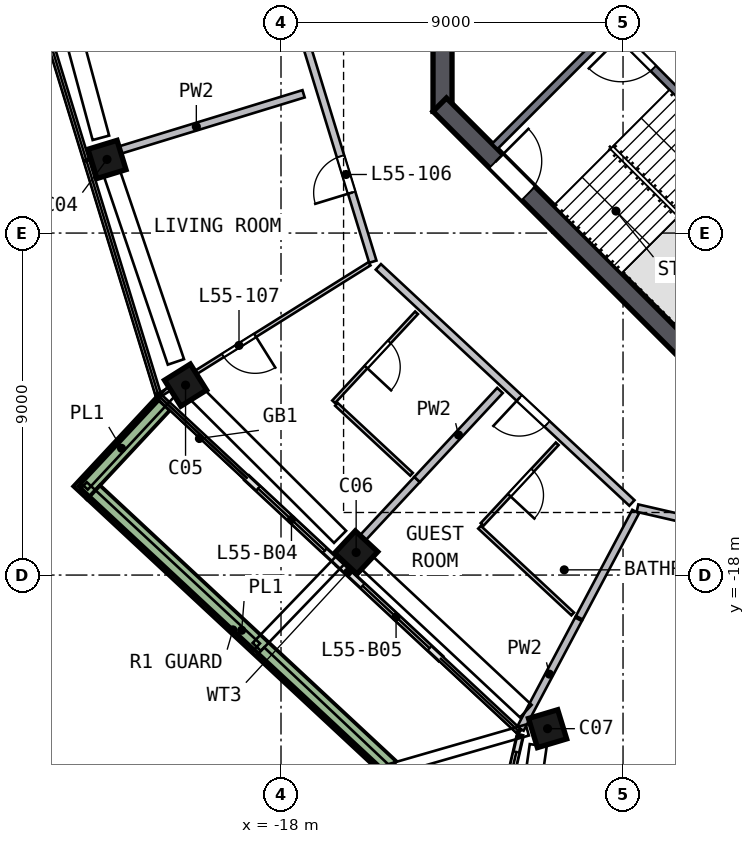
"""IFC4 building model, lengths in metres.
Left out: names, types, materials, properties, quantities, classifications, styles, units other than length and angle.
Written with IfcOpenShell. Run it as: python <this file> out.ifc"""

import sys

from ifc_helpers import new_model, si_unit, direction, frame, frame_2d, origin, origin_2d, place, context, subcontext, project, spatial, rectangle, extrude, element, fill, save


model = new_model("IFC4")
c1 = context("Model", 3, precision=1e-05, world=origin(), true_north=direction((0.0, 1.0)))
c2 = subcontext(c1, "Body", "Model", "MODEL_VIEW")
j1 = project(units=[si_unit("LENGTHUNIT", "METRE"), si_unit("PLANEANGLEUNIT", "RADIAN")], contexts=[c1])
p1 = place(None, origin())
s1 = spatial("IfcSite", under=j1, at=p1, CompositionType="ELEMENT")
p2 = place(p1, origin())
s2 = spatial("IfcBuilding", under=s1, at=p2, CompositionType="ELEMENT")
p3 = place(p2, frame((0.0, 0.0, 227.0)))
s3 = spatial("IfcBuildingStorey", under=s2, at=p3, CompositionType="ELEMENT", Elevation=227.0)
p4 = place(p3, frame((-22.62, -6.933, 0.0), z_axis=(0.033841596, -0.107304475, 0.993650087), x_axis=(0.290813838, -0.950141415, -0.112510462)))
e1 = element("IfcColumn", 1, at=p4, inside=s3, PredefinedType="COLUMN", context=c2, shape_type="SweptSolid", body=[
    extrude(rectangle(XDim=0.8, YDim=0.8, at=origin_2d()), origin(), (0.0, 0.0, 1.0), 3.21),
])
p5 = place(p3, frame((-20.587, -12.884, 0.0), z_axis=(0.062110189, -0.097384519, 0.993306891), x_axis=(-0.52699861, 0.841980994, 0.115500958)))
e2 = element("IfcColumn", 2, at=p5, inside=s3, PredefinedType="COLUMN", context=c2, shape_type="SweptSolid", body=[
    extrude(rectangle(XDim=0.8, YDim=0.8, at=origin_2d()), origin(), (0.0, 0.0, 1.0), 3.211),
])
p6 = place(p3, frame((-16.123, -17.314, 0.0), z_axis=(0.082969105, -0.075972627, 0.993651995), x_axis=(0.727116922, -0.677234205, -0.112493612)))
e3 = element("IfcColumn", 3, at=p6, inside=s3, PredefinedType="COLUMN", context=c2, shape_type="SweptSolid", body=[
    extrude(rectangle(XDim=0.8, YDim=0.8, at=origin_2d()), origin(), (0.0, 0.0, 1.0), 3.21),
])
p7 = place(p3, frame((-11.113, -21.979, 0.0), z_axis=(0.104966556, -0.051989228, 0.993115876), x_axis=(-0.285378183, 0.95505692, 0.080159667)))
e4 = element("IfcColumn", 4, at=p7, inside=s3, PredefinedType="COLUMN", context=c2, shape_type="SweptSolid", body=[
    extrude(rectangle(XDim=0.8, YDim=0.8, at=origin_2d()), origin(), (0.0, 0.0, 1.0), 3.212),
])
p8 = place(p3, frame((-7.25, -23.224, 0.0), z_axis=(0.110686507, -0.03352524, 0.993289764), x_axis=(-0.225055489, -0.974314679, -0.007805907)))
e5 = element("IfcColumn", 5, at=p8, inside=s3, PredefinedType="COLUMN", context=c2, shape_type="SweptSolid", body=[
    extrude(rectangle(XDim=0.8, YDim=0.8, at=origin_2d()), origin(), (0.0, 0.0, 1.0), 3.211),
])
p9 = place(p3, frame((-13.75, 5.799, 0.0), z_axis=(0.0, 0.0, 1.0), x_axis=(0.0, -1.0, 0.0)))
e6 = element("IfcWall", 6, at=p9, inside=s3, PredefinedType="SHEAR", context=c2, shape_type="SweptSolid", body=[
    extrude(rectangle(XDim=11.598, YDim=0.5, at=frame_2d((5.799, 0.0))), origin(), (0.0, 0.0, 1.0), 3.5),
])
p10 = place(p9, frame((4.899, 0.0, 0.0)))
e7 = element("IfcOpeningElement", 7, at=p10, cuts=e6, PredefinedType="OPENING", context=c2, shape_type="SweptSolid", body=[
    extrude(rectangle(XDim=1.8, YDim=2.1, at=frame_2d((0.9, 1.05))), frame((0.0, 0.26, 0.0), z_axis=(0.0, -1.0, 0.0), x_axis=(1.0, 0.0, 0.0)), (0.0, 0.0, 1.0), 0.52),
])
p11 = place(p3, frame((-13.823, -5.622, 0.0), z_axis=(0.0, 0.0, 1.0), x_axis=(0.707106781, -0.707106781, 0.0)))
e8 = element("IfcWall", 8, at=p11, inside=s3, PredefinedType="SHEAR", context=c2, shape_type="SweptSolid", body=[
    extrude(rectangle(XDim=11.598, YDim=0.5, at=frame_2d((5.799, 0.0))), origin(), (0.0, 0.0, 1.0), 3.5),
])
p12 = place(p11, frame((2.099, 0.0, 0.0)))
e9 = element("IfcOpeningElement", 9, at=p12, cuts=e8, PredefinedType="OPENING", context=c2, shape_type="SweptSolid", body=[
    extrude(rectangle(XDim=1.2, YDim=2.1, at=frame_2d((0.6, 1.05))), frame((0.0, 0.26, 0.0), z_axis=(0.0, -1.0, 0.0), x_axis=(1.0, 0.0, 0.0)), (0.0, 0.0, 1.0), 0.52),
])
p13 = place(p3, frame((-18.896, -15.449, 0.0), z_axis=(0.0, 0.0, 1.0), x_axis=(0.731849441, -0.681466357, 0.0)))
e10 = element("IfcWall", 10, at=p13, inside=s3, PredefinedType="SOLIDWALL", context=c2, shape_type="SweptSolid", body=[
    extrude(rectangle(XDim=3.3, YDim=0.15, at=frame_2d((1.65, 0.0))), origin(), (0.0, 0.0, 1.0), 2.525),
])
p14 = place(p13, frame((0.4, 0.0, 0.0)))
e11 = element("IfcOpeningElement", 11, at=p14, cuts=e10, PredefinedType="OPENING", context=c2, shape_type="SweptSolid", body=[
    extrude(rectangle(XDim=2.4, YDim=2.4, at=frame_2d((1.2, 1.2))), frame((0.0, 0.085, 0.0), z_axis=(0.0, -1.0, 0.0), x_axis=(1.0, 0.0, 0.0)), (0.0, 0.0, 1.0), 0.17),
])
p15 = place(p3, frame((-16.481, -17.698, 0.0), z_axis=(0.0, 0.0, 1.0), x_axis=(0.7318309, -0.681486268, 0.0)))
e12 = element("IfcWall", 12, at=p15, inside=s3, PredefinedType="SOLIDWALL", context=c2, shape_type="SweptSolid", body=[
    extrude(rectangle(XDim=3.661, YDim=0.15, at=frame_2d((1.831, 0.0))), origin(), (0.0, 0.0, 1.0), 2.525),
])
p16 = place(p15, frame((0.861, 0.0, 0.0)))
e13 = element("IfcOpeningElement", 13, at=p16, cuts=e12, PredefinedType="OPENING", context=c2, shape_type="SweptSolid", body=[
    extrude(rectangle(XDim=2.4, YDim=2.4, at=frame_2d((1.2, 1.2))), frame((0.0, 0.085, 0.0), z_axis=(0.0, -1.0, 0.0), x_axis=(1.0, 0.0, 0.0)), (0.0, 0.0, 1.0), 0.17),
])
p17 = place(p3, frame((-11.718, -22.268, 0.0), z_axis=(0.0, 0.0, 1.0), x_axis=(-0.224218701, -0.974538852, 0.0)))
e14 = element("IfcWall", 14, at=p17, inside=s3, PredefinedType="SOLIDWALL", context=c2, shape_type="SweptSolid", body=[
    extrude(rectangle(XDim=3.2, YDim=0.15, at=frame_2d((1.6, 0.0))), origin(), (0.0, 0.0, 1.0), 2.525),
])
p18 = place(p17, frame((0.4, 0.0, 0.0)))
e15 = element("IfcOpeningElement", 15, at=p18, cuts=e14, PredefinedType="OPENING", context=c2, shape_type="SweptSolid", body=[
    extrude(rectangle(XDim=2.4, YDim=2.4, at=frame_2d((1.2, 1.2))), frame((0.0, 0.085, 0.0), z_axis=(0.0, -1.0, 0.0), x_axis=(1.0, 0.0, 0.0)), (0.0, 0.0, 1.0), 0.17),
])
p19 = place(p3, frame((-21.106, -13.494, 0.0), z_axis=(0.0, 0.0, 1.0), x_axis=(-0.681472097, -0.731844096, 0.0)))
e16 = element("IfcWall", 16, at=p19, inside=s3, PredefinedType="SOLIDWALL", context=c2, shape_type="SweptSolid", body=[
    extrude(rectangle(XDim=3.199, YDim=0.5, at=frame_2d((1.6, 0.0))), origin(), (0.0, 0.0, 1.0), 0.7),
])
p20 = place(p3, frame((-22.933, -15.823, 0.0), z_axis=(0.0, 0.0, 1.0), x_axis=(0.731834456, -0.681482449, 0.0)))
e17 = element("IfcWall", 17, at=p20, inside=s3, PredefinedType="SOLIDWALL", context=c2, shape_type="SweptSolid", body=[
    extrude(rectangle(XDim=10.653, YDim=0.5, at=frame_2d((5.326, 0.0))), origin(), (0.0, 0.0, 1.0), 0.7),
])
p21 = place(p3, frame((-3.535, -9.334, 0.0), z_axis=(0.0, 0.0, 1.0), x_axis=(-0.707120946, 0.707092617, 0.0)))
e18 = element("IfcWall", 18, at=p21, inside=s3, PredefinedType="SOLIDWALL", context=c2, shape_type="SweptSolid", body=[
    extrude(rectangle(XDim=8.618, YDim=0.2, at=frame_2d((4.309, 0.0))), origin(), (0.0, 0.0, 1.0), 3.19),
])
p22 = place(p21, frame((6.6, 0.0, 0.0)))
e19 = element("IfcOpeningElement", 19, at=p22, cuts=e18, PredefinedType="OPENING", context=c2, shape_type="SweptSolid", body=[
    extrude(rectangle(XDim=1.2, YDim=2.1, at=frame_2d((0.6, 1.05))), frame((0.0, 0.11, 0.0), z_axis=(0.0, -1.0, 0.0), x_axis=(1.0, 0.0, 0.0)), (0.0, 0.0, 1.0), 0.22),
])
p23 = place(p3, frame((-9.334, -3.677, 0.0), z_axis=(0.0, 0.0, 1.0), x_axis=(-0.707135168, -0.707078393, 0.0)))
e20 = element("IfcWall", 20, at=p23, inside=s3, PredefinedType="SOLIDWALL", context=c2, shape_type="SweptSolid", body=[
    extrude(rectangle(XDim=4.3, YDim=0.2, at=frame_2d((2.15, 0.0))), origin(), (0.0, 0.0, 1.0), 3.19),
])
p24 = place(p3, frame((-15.584, -9.753, 0.0), z_axis=(0.0, 0.0, 1.0), x_axis=(-0.293036013, 0.956101404, 0.0)))
e21 = element("IfcWall", 21, at=p24, inside=s3, PredefinedType="SOLIDWALL", context=c2, shape_type="SweptSolid", body=[
    extrude(rectangle(XDim=9.316, YDim=0.2, at=frame_2d((4.658, 0.0))), origin(), (0.0, 0.0, 1.0), 3.19),
])
p25 = place(p24, frame((1.9, 0.0, 0.0)))
e22 = element("IfcOpeningElement", 22, at=p25, cuts=e21, PredefinedType="OPENING", context=c2, shape_type="SweptSolid", body=[
    extrude(rectangle(XDim=1.0, YDim=2.1, at=frame_2d((0.5, 1.05))), frame((0.0, 0.11, 0.0), z_axis=(0.0, -1.0, 0.0), x_axis=(1.0, 0.0, 0.0)), (0.0, 0.0, 1.0), 0.22),
])
p26 = place(p3, frame((-8.766, -16.103, 0.0), z_axis=(0.0, 0.0, 1.0), x_axis=(-0.731831338, 0.681485798, 0.0)))
e23 = element("IfcWall", 23, at=p26, inside=s3, PredefinedType="SOLIDWALL", context=c2, shape_type="SweptSolid", body=[
    extrude(rectangle(XDim=9.117, YDim=0.2, at=frame_2d((4.558, 0.0))), origin(), (0.0, 0.0, 1.0), 3.19),
])
p27 = place(p26, frame((3.05, 0.0, 0.0)))
e24 = element("IfcOpeningElement", 24, at=p27, cuts=e23, PredefinedType="OPENING", context=c2, shape_type="SweptSolid", body=[
    extrude(rectangle(XDim=1.0, YDim=2.1, at=frame_2d((0.5, 1.05))), frame((0.0, 0.11, 0.0), z_axis=(0.0, -1.0, 0.0), x_axis=(1.0, 0.0, 0.0)), (0.0, 0.0, 1.0), 0.22),
])
p28 = place(p3, frame((0.654, -18.373, 0.0), z_axis=(0.0, 0.0, 1.0), x_axis=(-0.974527215, 0.224269274, 0.0)))
e25 = element("IfcWall", 25, at=p28, inside=s3, PredefinedType="SOLIDWALL", context=c2, shape_type="SweptSolid", body=[
    extrude(rectangle(XDim=9.517, YDim=0.2, at=frame_2d((4.758, 0.0))), origin(), (0.0, 0.0, 1.0), 3.19),
])
p29 = place(p28, frame((3.842, 0.0, 0.0)))
e26 = element("IfcOpeningElement", 26, at=p29, cuts=e25, PredefinedType="OPENING", context=c2, shape_type="SweptSolid", body=[
    extrude(rectangle(XDim=1.8, YDim=2.1, at=frame_2d((0.9, 1.05))), frame((0.0, 0.11, 0.0), z_axis=(0.0, -1.0, 0.0), x_axis=(1.0, 0.0, 0.0)), (0.0, 0.0, 1.0), 0.22),
])
p30 = place(p3, frame((-17.406, -5.335, 0.0), z_axis=(0.0, 0.0, 1.0), x_axis=(-0.956095937, -0.293053849, 0.0)))
e27 = element("IfcWall", 27, at=p30, inside=s3, PredefinedType="SOLIDWALL", context=c2, shape_type="SweptSolid", body=[
    extrude(rectangle(XDim=5.902, YDim=0.2, at=frame_2d((2.951, 0.0))), origin(), (0.0, 0.0, 1.0), 3.19),
])
p31 = place(p3, frame((-14.419, -15.484, 0.0), z_axis=(0.0, 0.0, 1.0), x_axis=(-0.681456745, -0.731858391, 0.0)))
e28 = element("IfcWall", 28, at=p31, inside=s3, PredefinedType="SOLIDWALL", context=c2, shape_type="SweptSolid", body=[
    extrude(rectangle(XDim=2.95, YDim=0.2, at=frame_2d((1.475, 0.0))), origin(), (0.0, 0.0, 1.0), 3.19),
])
p32 = place(p3, frame((-12.238, -13.142, 0.0), z_axis=(0.0, 0.0, 1.0), x_axis=(-0.681483346, -0.731833621, 0.0)))
e29 = element("IfcWall", 29, at=p32, inside=s3, PredefinedType="SOLIDWALL", context=c2, shape_type="SweptSolid", body=[
    extrude(rectangle(XDim=3.2, YDim=0.2, at=frame_2d((1.6, 0.0))), origin(), (0.0, 0.0, 1.0), 3.19),
])
p33 = place(p3, frame((-11.705, -22.05, 0.0), z_axis=(0.0, 0.0, 1.0), x_axis=(0.468862108, 0.883271376, 0.0)))
e30 = element("IfcWall", 30, at=p33, inside=s3, PredefinedType="SOLIDWALL", context=c2, shape_type="SweptSolid", body=[
    extrude(rectangle(XDim=3.269, YDim=0.2, at=frame_2d((1.634, 0.0))), origin(), (0.0, 0.0, 1.0), 3.19),
])
p34 = place(p3, frame((-10.151, -19.123, 0.0), z_axis=(0.0, 0.0, 1.0), x_axis=(0.468919942, 0.883240674, 0.0)))
e31 = element("IfcWall", 31, at=p34, inside=s3, PredefinedType="SOLIDWALL", context=c2, shape_type="SweptSolid", body=[
    extrude(rectangle(XDim=3.161, YDim=0.2, at=frame_2d((1.581, 0.0))), origin(), (0.0, 0.0, 1.0), 3.19),
])
p35 = place(p3, frame((-8.042, -27.148, 0.0), z_axis=(0.0, 0.0, 1.0), x_axis=(0.224281387, 0.974524427, 0.0)))
e32 = element("IfcWall", 32, at=p35, inside=s3, PredefinedType="SOLIDWALL", context=c2, shape_type="SweptSolid", body=[
    extrude(rectangle(XDim=10.302, YDim=0.2, at=frame_2d((5.151, 0.0))), origin(), (0.0, 0.0, 1.0), 3.19),
])
p36 = place(p35, frame((2.5, 0.0, 0.0)))
e33 = element("IfcOpeningElement", 33, at=p36, cuts=e32, PredefinedType="OPENING", context=c2, shape_type="SweptSolid", body=[
    extrude(rectangle(XDim=1.0, YDim=2.1, at=frame_2d((0.5, 1.05))), frame((0.0, 0.11, 0.0), z_axis=(0.0, -1.0, 0.0), x_axis=(1.0, 0.0, 0.0)), (0.0, 0.0, 1.0), 0.22),
])
p37 = place(p3, frame((-15.672, -9.808, 0.0), z_axis=(0.0, 0.0, 1.0), x_axis=(-0.847695291, -0.530483453, 0.0)))
e34 = element("IfcWall", 34, at=p37, inside=s3, PredefinedType="PARTITIONING", context=c2, shape_type="SweptSolid", body=[
    extrude(rectangle(XDim=6.476, YDim=0.1, at=frame_2d((3.238, 0.0))), origin(), (0.0, 0.0, 1.0), 3.19),
])
p38 = place(p37, frame((3.55, 0.0, 0.0)))
e35 = element("IfcOpeningElement", 35, at=p38, cuts=e34, PredefinedType="OPENING", context=c2, shape_type="SweptSolid", body=[
    extrude(rectangle(XDim=1.0, YDim=2.1, at=frame_2d((0.5, 1.05))), frame((0.0, 0.06, 0.0), z_axis=(0.0, -1.0, 0.0), x_axis=(1.0, 0.0, 0.0)), (0.0, 0.0, 1.0), 0.12),
])
p39 = place(p3, frame((-16.542, -13.508, 0.0), z_axis=(0.0, 0.0, 1.0), x_axis=(0.731884644, -0.681428549, 0.0)))
e36 = element("IfcWall", 36, at=p39, inside=s3, PredefinedType="PARTITIONING", context=c2, shape_type="SweptSolid", body=[
    extrude(rectangle(XDim=2.7, YDim=0.1, at=frame_2d((1.35, 0.0))), origin(), (0.0, 0.0, 1.0), 3.19),
])
p40 = place(p3, frame((-14.434, -11.098, 0.0), z_axis=(0.0, 0.0, 1.0), x_axis=(-0.681480535, -0.731836239, 0.0)))
e37 = element("IfcWall", 37, at=p40, inside=s3, PredefinedType="PARTITIONING", context=c2, shape_type="SweptSolid", body=[
    extrude(rectangle(XDim=3.2, YDim=0.1, at=frame_2d((1.6, 0.0))), origin(), (0.0, 0.0, 1.0), 3.19),
])
p41 = place(p40, frame((1.05, 0.0, 0.0)))
e38 = element("IfcOpeningElement", 38, at=p41, cuts=e37, PredefinedType="OPENING", context=c2, shape_type="SweptSolid", body=[
    extrude(rectangle(XDim=0.9, YDim=2.1, at=frame_2d((0.45, 1.05))), frame((0.0, 0.06, 0.0), z_axis=(0.0, -1.0, 0.0), x_axis=(1.0, 0.0, 0.0)), (0.0, 0.0, 1.0), 0.12),
])
p42 = place(p3, frame((-10.732, -14.545, 0.0), z_axis=(0.0, 0.0, 1.0), x_axis=(-0.681486946, -0.731830269, 0.0)))
e39 = element("IfcWall", 39, at=p42, inside=s3, PredefinedType="PARTITIONING", context=c2, shape_type="SweptSolid", body=[
    extrude(rectangle(XDim=2.9, YDim=0.1, at=frame_2d((1.45, 0.0))), origin(), (0.0, 0.0, 1.0), 3.19),
])
p43 = place(p42, frame((0.95, 0.0, 0.0)))
e40 = element("IfcOpeningElement", 40, at=p43, cuts=e39, PredefinedType="OPENING", context=c2, shape_type="SweptSolid", body=[
    extrude(rectangle(XDim=0.9, YDim=2.1, at=frame_2d((0.45, 1.05))), frame((0.0, 0.06, 0.0), z_axis=(0.0, -1.0, 0.0), x_axis=(1.0, 0.0, 0.0)), (0.0, 0.0, 1.0), 0.12),
])
p44 = place(p3, frame((-10.325, -19.024, 0.0), z_axis=(0.0, 0.0, 1.0), x_axis=(-0.731835072, 0.681481788, 0.0)))
e41 = element("IfcWall", 41, at=p44, inside=s3, PredefinedType="PARTITIONING", context=c2, shape_type="SweptSolid", body=[
    extrude(rectangle(XDim=3.35, YDim=0.1, at=frame_2d((1.675, 0.0))), origin(), (0.0, 0.0, 1.0), 3.19),
])
p45 = place(p14, origin())
e42 = element("IfcDoor", 42, at=p45, inside=s3, OperationType="SLIDING_TO_RIGHT", PredefinedType="DOOR", context=c2, shape_type="SweptSolid", body=[
    extrude(rectangle(XDim=2.4, YDim=2.4, at=frame_2d((1.2, 1.2))), frame((0.0, 0.025, 0.0), z_axis=(0.0, -1.0, 0.0), x_axis=(1.0, 0.0, 0.0)), (0.0, 0.0, 1.0), 0.05),
])
fill(e11, e42)
p46 = place(p16, origin())
e43 = element("IfcDoor", 43, at=p46, inside=s3, OperationType="SLIDING_TO_LEFT", PredefinedType="DOOR", context=c2, shape_type="SweptSolid", body=[
    extrude(rectangle(XDim=2.4, YDim=2.4, at=frame_2d((1.2, 1.2))), frame((0.0, 0.025, 0.0), z_axis=(0.0, -1.0, 0.0), x_axis=(1.0, 0.0, 0.0)), (0.0, 0.0, 1.0), 0.05),
])
fill(e13, e43)
p47 = place(p18, origin())
e44 = element("IfcDoor", 44, at=p47, inside=s3, OperationType="SLIDING_TO_LEFT", PredefinedType="DOOR", context=c2, shape_type="SweptSolid", body=[
    extrude(rectangle(XDim=2.4, YDim=2.4, at=frame_2d((1.2, 1.2))), frame((0.0, 0.025, 0.0), z_axis=(0.0, -1.0, 0.0), x_axis=(1.0, 0.0, 0.0)), (0.0, 0.0, 1.0), 0.05),
])
fill(e15, e44)
p48 = place(p22, origin())
e45 = element("IfcDoor", 45, at=p48, inside=s3, OperationType="SINGLE_SWING_RIGHT", PredefinedType="DOOR", context=c2, shape_type="SweptSolid", body=[
    extrude(rectangle(XDim=1.2, YDim=2.1, at=frame_2d((0.6, 1.05))), frame((0.0, 0.025, 0.0), z_axis=(0.0, -1.0, 0.0), x_axis=(1.0, 0.0, 0.0)), (0.0, 0.0, 1.0), 0.05),
])
fill(e19, e45)
p49 = place(p12, origin())
e46 = element("IfcDoor", 46, at=p49, inside=s3, OperationType="SINGLE_SWING_LEFT", PredefinedType="DOOR", context=c2, shape_type="SweptSolid", body=[
    extrude(rectangle(XDim=1.2, YDim=2.1, at=frame_2d((0.6, 1.05))), frame((0.0, 0.025, 0.0), z_axis=(0.0, -1.0, 0.0), x_axis=(1.0, 0.0, 0.0)), (0.0, 0.0, 1.0), 0.05),
])
fill(e9, e46)
p50 = place(p25, origin())
e47 = element("IfcDoor", 47, at=p50, inside=s3, OperationType="SINGLE_SWING_LEFT", PredefinedType="DOOR", context=c2, shape_type="SweptSolid", body=[
    extrude(rectangle(XDim=1.0, YDim=2.1, at=frame_2d((0.5, 1.05))), frame((0.0, 0.025, 0.0), z_axis=(0.0, -1.0, 0.0), x_axis=(1.0, 0.0, 0.0)), (0.0, 0.0, 1.0), 0.05),
])
fill(e22, e47)
p51 = place(p38, origin())
e48 = element("IfcDoor", 48, at=p51, inside=s3, OperationType="SINGLE_SWING_LEFT", PredefinedType="DOOR", context=c2, shape_type="SweptSolid", body=[
    extrude(rectangle(XDim=1.0, YDim=2.1, at=frame_2d((0.5, 1.05))), frame((0.0, 0.025, 0.0), z_axis=(0.0, -1.0, 0.0), x_axis=(1.0, 0.0, 0.0)), (0.0, 0.0, 1.0), 0.05),
])
fill(e35, e48)
p52 = place(p41, origin())
e49 = element("IfcDoor", 49, at=p52, inside=s3, OperationType="SINGLE_SWING_RIGHT", PredefinedType="DOOR", context=c2, shape_type="SweptSolid", body=[
    extrude(rectangle(XDim=0.9, YDim=2.1, at=frame_2d((0.45, 1.05))), frame((0.0, 0.025, 0.0), z_axis=(0.0, -1.0, 0.0), x_axis=(1.0, 0.0, 0.0)), (0.0, 0.0, 1.0), 0.05),
])
fill(e38, e49)
p53 = place(p27, origin())
e50 = element("IfcDoor", 50, at=p53, inside=s3, OperationType="SINGLE_SWING_RIGHT", PredefinedType="DOOR", context=c2, shape_type="SweptSolid", body=[
    extrude(rectangle(XDim=1.0, YDim=2.1, at=frame_2d((0.5, 1.05))), frame((0.0, 0.025, 0.0), z_axis=(0.0, -1.0, 0.0), x_axis=(1.0, 0.0, 0.0)), (0.0, 0.0, 1.0), 0.05),
])
fill(e24, e50)
p54 = place(p43, origin())
e51 = element("IfcDoor", 51, at=p54, inside=s3, OperationType="SINGLE_SWING_RIGHT", PredefinedType="DOOR", context=c2, shape_type="SweptSolid", body=[
    extrude(rectangle(XDim=0.9, YDim=2.1, at=frame_2d((0.45, 1.05))), frame((0.0, 0.025, 0.0), z_axis=(0.0, -1.0, 0.0), x_axis=(1.0, 0.0, 0.0)), (0.0, 0.0, 1.0), 0.05),
])
fill(e40, e51)
save(model, sys.argv[1])
